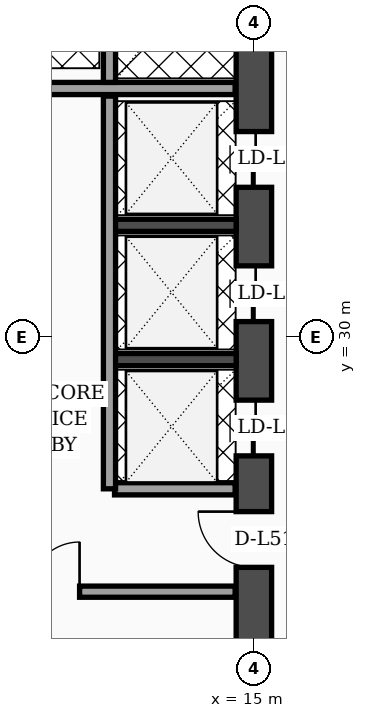
"""IFC4 building model, lengths in metres.
Left out: names, types, materials, properties, quantities, classifications, styles, units other than length and angle.
Written with IfcOpenShell. Run it as: python <this file> out.ifc"""

import sys

from ifc_helpers import new_model, si_unit, direction, frame, frame_2d, origin, place, context, subcontext, project, spatial, rectangle, extrude, element, fill, save


model = new_model("IFC4")
c1 = context("Model", 3, precision=1e-05, world=origin(), true_north=direction((0.0, 1.0)))
c2 = subcontext(c1, "Body", "Model", "MODEL_VIEW")
j1 = project(units=[si_unit("LENGTHUNIT", "METRE"), si_unit("PLANEANGLEUNIT", "RADIAN")], contexts=[c1])
p1 = place(None, origin())
s1 = spatial("IfcSite", under=j1, at=p1, CompositionType="ELEMENT")
p2 = place(p1, origin())
s2 = spatial("IfcBuilding", under=s1, at=p2, CompositionType="ELEMENT")
p3 = place(p2, frame((0.0, 0.0, 207.2)))
s3 = spatial("IfcBuildingStorey", under=s2, at=p3, CompositionType="ELEMENT", Elevation=207.2)
p4 = place(p3, frame((15.0, 16.8, 0.0), z_axis=(0.0, 0.0, 1.0), x_axis=(0.0, 1.0, 0.0)))
e1 = element("IfcWall", 1, at=p4, inside=s3, PredefinedType="SHEAR", context=c2, shape_type="SweptSolid", body=[
    extrude(rectangle(XDim=21.6, YDim=0.7, at=frame_2d((10.8, 0.0))), origin(), (0.0, 0.0, 1.0), 3.56),
])
p5 = place(p4, frame((8.65, 0.0, 0.0)))
e2 = element("IfcOpeningElement", 2, at=p5, cuts=e1, PredefinedType="OPENING", context=c2, shape_type="SweptSolid", body=[
    extrude(rectangle(XDim=1.1, YDim=2.2, at=frame_2d((0.55, 1.1))), frame((0.0, 0.36, 0.0), z_axis=(0.0, -1.0, 0.0), x_axis=(1.0, 0.0, 0.0)), (0.0, 0.0, 1.0), 0.72),
])
p6 = place(p4, frame((10.85, 0.0, 0.0)))
e3 = element("IfcOpeningElement", 3, at=p6, cuts=e1, PredefinedType="OPENING", context=c2, shape_type="SweptSolid", body=[
    extrude(rectangle(XDim=1.1, YDim=2.2, at=frame_2d((0.55, 1.1))), frame((0.0, 0.36, 0.0), z_axis=(0.0, -1.0, 0.0), x_axis=(1.0, 0.0, 0.0)), (0.0, 0.0, 1.0), 0.72),
])
p7 = place(p4, frame((13.5, 0.0, 0.0)))
e4 = element("IfcOpeningElement", 4, at=p7, cuts=e1, PredefinedType="OPENING", context=c2, shape_type="SweptSolid", body=[
    extrude(rectangle(XDim=1.1, YDim=2.2, at=frame_2d((0.55, 1.1))), frame((0.0, 0.36, 0.0), z_axis=(0.0, -1.0, 0.0), x_axis=(1.0, 0.0, 0.0)), (0.0, 0.0, 1.0), 0.72),
])
p8 = place(p4, frame((16.15, 0.0, 0.0)))
e5 = element("IfcOpeningElement", 5, at=p8, cuts=e1, PredefinedType="OPENING", context=c2, shape_type="SweptSolid", body=[
    extrude(rectangle(XDim=1.1, YDim=2.2, at=frame_2d((0.55, 1.1))), frame((0.0, 0.36, 0.0), z_axis=(0.0, -1.0, 0.0), x_axis=(1.0, 0.0, 0.0)), (0.0, 0.0, 1.0), 0.72),
])
for number, where, z_axis, x_axis in (
    (6, (12.18, 29.55, 0.0), (0.0, 0.0, 1.0), (1.0, 0.0, 0.0)),
    (7, (12.18, 32.2, 0.0), (0.0, 0.0, 1.0), (1.0, 0.0, 0.0)),
):
    element("IfcWall", number, at=place(p3, frame(where, z_axis=z_axis, x_axis=x_axis)), inside=s3, PredefinedType="SOLIDWALL", context=c2, shape_type="SweptSolid", body=[
        extrude(rectangle(XDim=2.47, YDim=0.24, at=frame_2d((1.235, 0.0))), origin(), (0.0, 0.0, 1.0), 3.56),
    ])
p9 = place(p3, frame((9.68, 24.97, 0.0), z_axis=(0.0, 0.0, 1.0), x_axis=(1.0, 0.0, 0.0)))
e8 = element("IfcWall", 8, at=p9, inside=s3, PredefinedType="SOLIDWALL", context=c2, shape_type="SweptSolid", body=[
    extrude(rectangle(XDim=4.95, YDim=0.22, at=frame_2d((2.475, 0.0))), origin(), (0.0, 0.0, 1.0), 2.94),
])
p10 = place(p9, frame((0.9, 0.0, 0.0)))
e9 = element("IfcOpeningElement", 9, at=p10, cuts=e8, PredefinedType="OPENING", context=c2, shape_type="SweptSolid", body=[
    extrude(rectangle(XDim=0.98, YDim=2.15, at=frame_2d((0.49, 1.075))), frame((0.0, 0.12, 0.0), z_axis=(0.0, -1.0, 0.0), x_axis=(1.0, 0.0, 0.0)), (0.0, 0.0, 1.0), 0.24),
])
p11 = place(p3, frame((12.25, 27.0, 0.0), z_axis=(0.0, 0.0, 1.0), x_axis=(1.0, 0.0, 0.0)))
e10 = element("IfcWall", 10, at=p11, inside=s3, PredefinedType="SOLIDWALL", context=c2, shape_type="SweptSolid", body=[
    extrude(rectangle(XDim=2.38, YDim=0.24, at=frame_2d((1.19, 0.0))), origin(), (0.0, 0.0, 1.0), 3.56),
])
p12 = place(p3, frame((12.15, 27.0, 0.0), z_axis=(0.0, 0.0, 1.0), x_axis=(0.0, 1.0, 0.0)))
e11 = element("IfcWall", 11, at=p12, inside=s3, PredefinedType="SOLIDWALL", context=c2, shape_type="SweptSolid", body=[
    extrude(rectangle(XDim=7.75, YDim=0.24, at=frame_2d((3.875, 0.0))), origin(), (0.0, 0.0, 1.0), 3.56),
])
p13 = place(p3, frame((9.66, 34.9, 0.0), z_axis=(0.0, 0.0, 1.0), x_axis=(1.0, 0.0, 0.0)))
e12 = element("IfcWall", 12, at=p13, inside=s3, PredefinedType="SOLIDWALL", context=c2, shape_type="SweptSolid", body=[
    extrude(rectangle(XDim=4.97, YDim=0.24, at=frame_2d((2.485, 0.0))), origin(), (0.0, 0.0, 1.0), 3.56),
])
p14 = place(p3, frame((12.15, 35.02, 0.0), z_axis=(0.0, 0.0, 1.0), x_axis=(0.0, 1.0, 0.0)))
e13 = element("IfcWall", 13, at=p14, inside=s3, PredefinedType="SOLIDWALL", context=c2, shape_type="SweptSolid", body=[
    extrude(rectangle(XDim=3.01, YDim=0.24, at=frame_2d((1.505, 0.0))), origin(), (0.0, 0.0, 1.0), 3.56),
])
p15 = place(p10, origin())
e14 = element("IfcDoor", 14, at=p15, inside=s3, OperationType="SINGLE_SWING_RIGHT", PredefinedType="DOOR", context=c2, shape_type="SweptSolid", body=[
    extrude(rectangle(XDim=0.98, YDim=2.15, at=frame_2d((0.49, 1.075))), frame((0.0, 0.025, 0.0), z_axis=(0.0, -1.0, 0.0), x_axis=(1.0, 0.0, 0.0)), (0.0, 0.0, 1.0), 0.05),
])
fill(e9, e14)
p16 = place(p5, origin())
e15 = element("IfcDoor", 15, at=p16, inside=s3, OperationType="SINGLE_SWING_RIGHT", PredefinedType="DOOR", context=c2, shape_type="SweptSolid", body=[
    extrude(rectangle(XDim=1.1, YDim=2.2, at=frame_2d((0.55, 1.1))), frame((0.0, 0.025, 0.0), z_axis=(0.0, -1.0, 0.0), x_axis=(1.0, 0.0, 0.0)), (0.0, 0.0, 1.0), 0.05),
])
fill(e2, e15)
p17 = place(p6, origin())
e16 = element("IfcDoor", 16, at=p17, inside=s3, OperationType="DOUBLE_DOOR_SLIDING", PredefinedType="DOOR", context=c2, shape_type="SweptSolid", body=[
    extrude(rectangle(XDim=1.1, YDim=2.2, at=frame_2d((0.55, 1.1))), frame((0.0, 0.025, 0.0), z_axis=(0.0, -1.0, 0.0), x_axis=(1.0, 0.0, 0.0)), (0.0, 0.0, 1.0), 0.05),
])
fill(e3, e16)
p18 = place(p7, origin())
e17 = element("IfcDoor", 17, at=p18, inside=s3, OperationType="DOUBLE_DOOR_SLIDING", PredefinedType="DOOR", context=c2, shape_type="SweptSolid", body=[
    extrude(rectangle(XDim=1.1, YDim=2.2, at=frame_2d((0.55, 1.1))), frame((0.0, 0.025, 0.0), z_axis=(0.0, -1.0, 0.0), x_axis=(1.0, 0.0, 0.0)), (0.0, 0.0, 1.0), 0.05),
])
fill(e4, e17)
p19 = place(p8, origin())
e18 = element("IfcDoor", 18, at=p19, inside=s3, OperationType="DOUBLE_DOOR_SLIDING", PredefinedType="DOOR", context=c2, shape_type="SweptSolid", body=[
    extrude(rectangle(XDim=1.1, YDim=2.2, at=frame_2d((0.55, 1.1))), frame((0.0, 0.025, 0.0), z_axis=(0.0, -1.0, 0.0), x_axis=(1.0, 0.0, 0.0)), (0.0, 0.0, 1.0), 0.05),
])
fill(e5, e18)
save(model, sys.argv[1])
